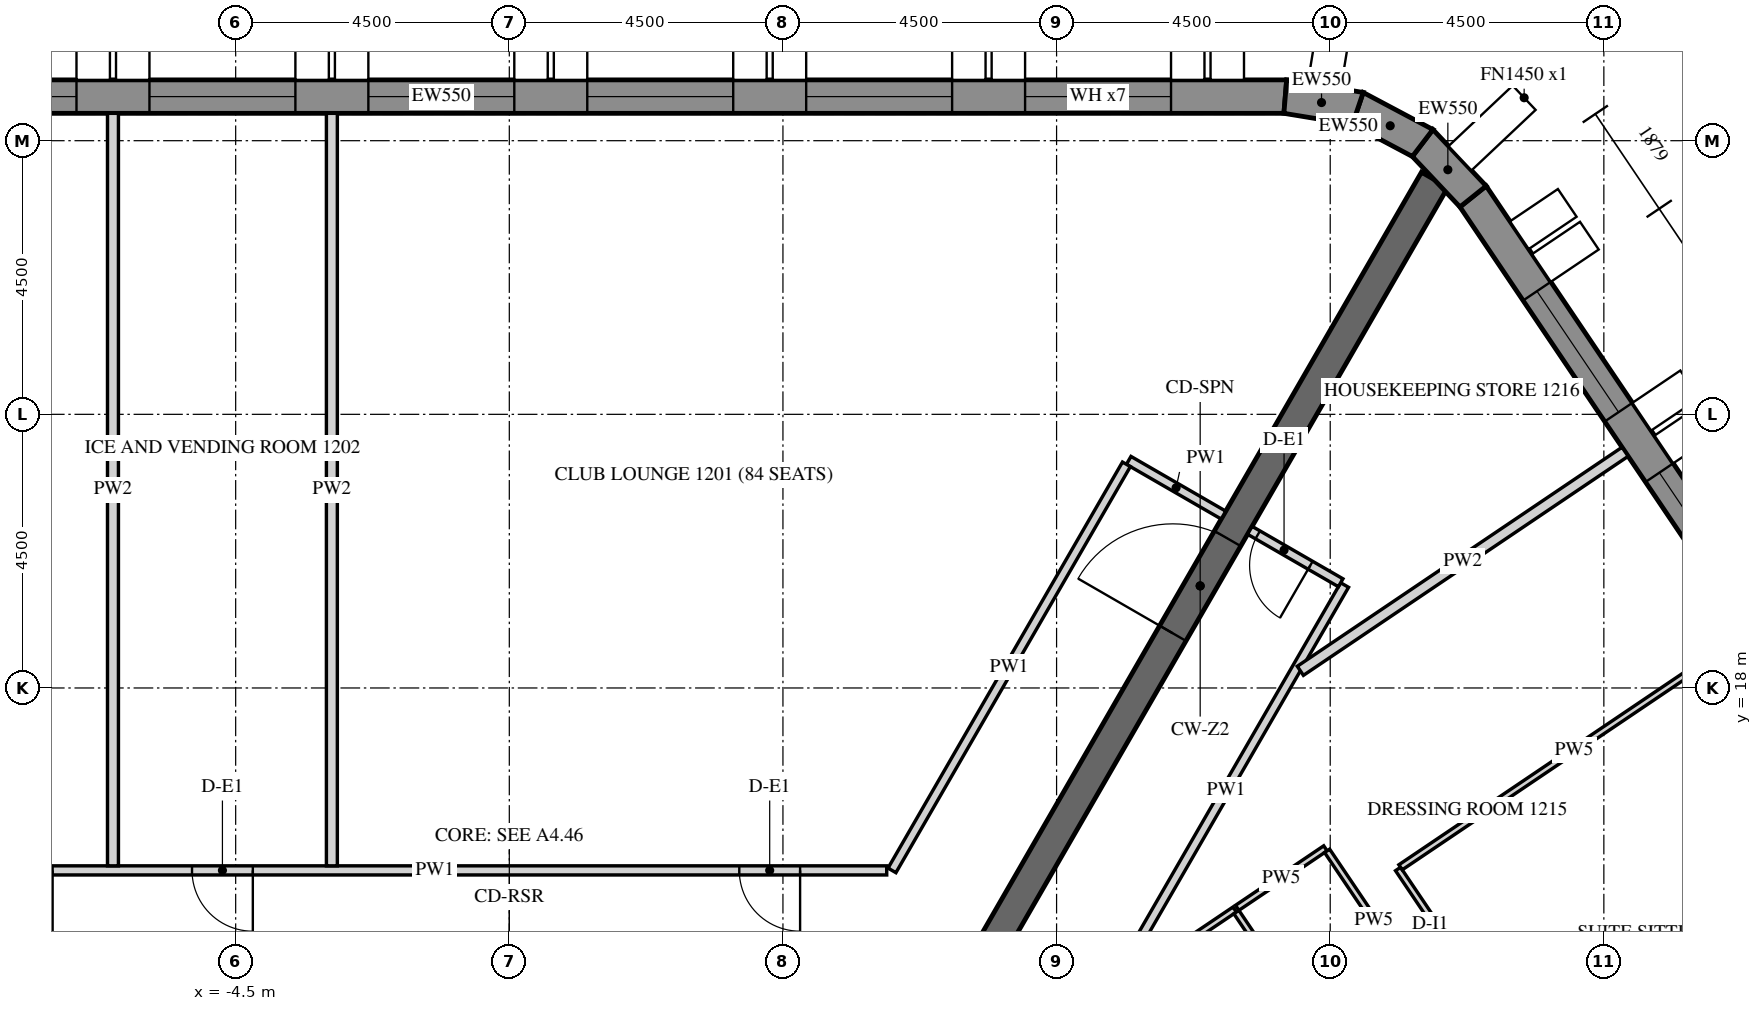
"""IFC4 building model, lengths in metres.
Left out: names, types, materials, properties, quantities, classifications, styles, units other than length and angle.
Written with IfcOpenShell. Run it as: python <this file> out.ifc"""

import sys

from ifc_helpers import new_model, si_unit, direction, frame, frame_2d, origin, place, context, subcontext, project, spatial, polyline, rectangle, outline, extrude, element, fill, save


model = new_model("IFC4")
c1 = context("Model", 3, precision=1e-05, world=origin(), true_north=direction((0.0, 1.0)))
c2 = subcontext(c1, "Body", "Model", "MODEL_VIEW")
j1 = project(units=[si_unit("LENGTHUNIT", "METRE"), si_unit("PLANEANGLEUNIT", "RADIAN")], contexts=[c1])
p1 = place(None, origin())
s1 = spatial("IfcSite", under=j1, at=p1, CompositionType="ELEMENT")
p2 = place(p1, origin())
s2 = spatial("IfcBuilding", under=s1, at=p2, CompositionType="ELEMENT")
p3 = place(p2, frame((0.0, 0.0, 164.4)))
s3 = spatial("IfcBuildingStorey", under=s2, at=p3, CompositionType="ELEMENT", Elevation=164.4)
p4 = place(p3, frame((12.761, 27.725, -0.15), z_axis=(0.0, 0.0, 1.0), x_axis=(-1.0, 0.0, 0.0)))
e1 = element("IfcWall", 1, at=p4, inside=s3, PredefinedType="SOLIDWALL", context=c2, shape_type="SweptSolid", body=[
    extrude(outline(polyline([(-0.022, -0.275), (27.783, -0.275), (27.732, 0.275), (0.022, 0.275), (-0.022, -0.275)])), origin(), (0.0, 0.0, 1.0), 3.9),
])
p5 = place(p4, frame((1.879, 0.0, 1.05)))
e2 = element("IfcOpeningElement", 2, at=p5, cuts=e1, PredefinedType="OPENING", context=c2, shape_type="SweptSolid", body=[
    extrude(rectangle(XDim=2.4, YDim=2.4, at=frame_2d((1.2, 1.2))), frame((0.0, 0.285, 0.0), z_axis=(0.0, -1.0, 0.0), x_axis=(1.0, 0.0, 0.0)), (0.0, 0.0, 1.0), 0.57),
])
p6 = place(p4, frame((5.479, 0.0, 1.05)))
e3 = element("IfcOpeningElement", 3, at=p6, cuts=e1, PredefinedType="OPENING", context=c2, shape_type="SweptSolid", body=[
    extrude(rectangle(XDim=2.4, YDim=2.4, at=frame_2d((1.2, 1.2))), frame((0.0, 0.285, 0.0), z_axis=(0.0, -1.0, 0.0), x_axis=(1.0, 0.0, 0.0)), (0.0, 0.0, 1.0), 0.57),
])
p7 = place(p4, frame((9.079, 0.0, 1.05)))
e4 = element("IfcOpeningElement", 4, at=p7, cuts=e1, PredefinedType="OPENING", context=c2, shape_type="SweptSolid", body=[
    extrude(rectangle(XDim=2.4, YDim=2.4, at=frame_2d((1.2, 1.2))), frame((0.0, 0.285, 0.0), z_axis=(0.0, -1.0, 0.0), x_axis=(1.0, 0.0, 0.0)), (0.0, 0.0, 1.0), 0.57),
])
p8 = place(p4, frame((12.679, 0.0, 1.05)))
e5 = element("IfcOpeningElement", 5, at=p8, cuts=e1, PredefinedType="OPENING", context=c2, shape_type="SweptSolid", body=[
    extrude(rectangle(XDim=2.4, YDim=2.4, at=frame_2d((1.2, 1.2))), frame((0.0, 0.285, 0.0), z_axis=(0.0, -1.0, 0.0), x_axis=(1.0, 0.0, 0.0)), (0.0, 0.0, 1.0), 0.57),
])
p9 = place(p4, frame((16.279, 0.0, 1.05)))
e6 = element("IfcOpeningElement", 6, at=p9, cuts=e1, PredefinedType="OPENING", context=c2, shape_type="SweptSolid", body=[
    extrude(rectangle(XDim=2.4, YDim=2.4, at=frame_2d((1.2, 1.2))), frame((0.0, 0.285, 0.0), z_axis=(0.0, -1.0, 0.0), x_axis=(1.0, 0.0, 0.0)), (0.0, 0.0, 1.0), 0.57),
])
p10 = place(p4, frame((19.879, 0.0, 1.05)))
e7 = element("IfcOpeningElement", 7, at=p10, cuts=e1, PredefinedType="OPENING", context=c2, shape_type="SweptSolid", body=[
    extrude(rectangle(XDim=2.4, YDim=2.4, at=frame_2d((1.2, 1.2))), frame((0.0, 0.285, 0.0), z_axis=(0.0, -1.0, 0.0), x_axis=(1.0, 0.0, 0.0)), (0.0, 0.0, 1.0), 0.57),
])
p11 = place(p4, frame((23.479, 0.0, 1.05)))
e8 = element("IfcOpeningElement", 8, at=p11, cuts=e1, PredefinedType="OPENING", context=c2, shape_type="SweptSolid", body=[
    extrude(rectangle(XDim=2.4, YDim=2.4, at=frame_2d((1.2, 1.2))), frame((0.0, 0.285, 0.0), z_axis=(0.0, -1.0, 0.0), x_axis=(1.0, 0.0, 0.0)), (0.0, 0.0, 1.0), 0.57),
])
p12 = place(p3, frame((31.371, 3.071, -0.15), z_axis=(0.0, 0.0, 1.0), x_axis=(-0.559189891278, 0.829039604297, 0.0)))
e9 = element("IfcWall", 9, at=p12, inside=s3, PredefinedType="SOLIDWALL", context=c2, shape_type="SweptSolid", body=[
    extrude(outline(polyline([(-0.026, -0.275), (27.781, -0.275), (27.736, 0.275), (0.026, 0.275), (-0.026, -0.275)])), origin(), (0.0, 0.0, 1.0), 3.9),
])
p13 = place(p12, frame((1.879, 0.0, 1.05)))
e10 = element("IfcOpeningElement", 10, at=p13, cuts=e9, PredefinedType="OPENING", context=c2, shape_type="SweptSolid", body=[
    extrude(rectangle(XDim=2.4, YDim=2.4, at=frame_2d((1.2, 1.2))), frame((0.0, 0.285, 0.0), z_axis=(0.0, -1.0, 0.0), x_axis=(1.0, 0.0, 0.0)), (0.0, 0.0, 1.0), 0.57),
])
p14 = place(p12, frame((5.479, 0.0, 1.05)))
e11 = element("IfcOpeningElement", 11, at=p14, cuts=e9, PredefinedType="OPENING", context=c2, shape_type="SweptSolid", body=[
    extrude(rectangle(XDim=2.4, YDim=2.4, at=frame_2d((1.2, 1.2))), frame((0.0, 0.285, 0.0), z_axis=(0.0, -1.0, 0.0), x_axis=(1.0, 0.0, 0.0)), (0.0, 0.0, 1.0), 0.57),
])
p15 = place(p12, frame((9.079, 0.0, 1.05)))
e12 = element("IfcOpeningElement", 12, at=p15, cuts=e9, PredefinedType="OPENING", context=c2, shape_type="SweptSolid", body=[
    extrude(rectangle(XDim=2.4, YDim=2.4, at=frame_2d((1.2, 1.2))), frame((0.0, 0.285, 0.0), z_axis=(0.0, -1.0, 0.0), x_axis=(1.0, 0.0, 0.0)), (0.0, 0.0, 1.0), 0.57),
])
p16 = place(p12, frame((12.679, 0.0, 1.05)))
e13 = element("IfcOpeningElement", 13, at=p16, cuts=e9, PredefinedType="OPENING", context=c2, shape_type="SweptSolid", body=[
    extrude(rectangle(XDim=2.4, YDim=2.4, at=frame_2d((1.2, 1.2))), frame((0.0, 0.285, 0.0), z_axis=(0.0, -1.0, 0.0), x_axis=(1.0, 0.0, 0.0)), (0.0, 0.0, 1.0), 0.57),
])
p17 = place(p12, frame((16.279, 0.0, 1.05)))
e14 = element("IfcOpeningElement", 14, at=p17, cuts=e9, PredefinedType="OPENING", context=c2, shape_type="SweptSolid", body=[
    extrude(rectangle(XDim=2.4, YDim=2.4, at=frame_2d((1.2, 1.2))), frame((0.0, 0.285, 0.0), z_axis=(0.0, -1.0, 0.0), x_axis=(1.0, 0.0, 0.0)), (0.0, 0.0, 1.0), 0.57),
])
p18 = place(p12, frame((19.879, 0.0, 1.05)))
e15 = element("IfcOpeningElement", 15, at=p18, cuts=e9, PredefinedType="OPENING", context=c2, shape_type="SweptSolid", body=[
    extrude(rectangle(XDim=2.4, YDim=2.4, at=frame_2d((1.2, 1.2))), frame((0.0, 0.285, 0.0), z_axis=(0.0, -1.0, 0.0), x_axis=(1.0, 0.0, 0.0)), (0.0, 0.0, 1.0), 0.57),
])
p19 = place(p12, frame((23.479, 0.0, 1.05)))
e16 = element("IfcOpeningElement", 16, at=p19, cuts=e9, PredefinedType="OPENING", context=c2, shape_type="SweptSolid", body=[
    extrude(rectangle(XDim=2.4, YDim=2.4, at=frame_2d((1.2, 1.2))), frame((0.0, 0.285, 0.0), z_axis=(0.0, -1.0, 0.0), x_axis=(1.0, 0.0, 0.0)), (0.0, 0.0, 1.0), 0.57),
])
p20 = place(p3, frame((15.849, 26.083, -0.15), z_axis=(0.0, 0.0, 1.0), x_axis=(-0.686196220404, 0.727416488061, 0.0)))
e17 = element("IfcWall", 17, at=p20, inside=s3, PredefinedType="SOLIDWALL", context=c2, shape_type="SweptSolid", body=[
    extrude(outline(polyline([(-0.022, -0.275), (1.253, -0.275), (1.163, 0.275), (0.022, 0.275), (-0.022, -0.275)])), origin(), (0.0, 0.0, 1.0), 3.9),
])
p21 = place(p3, frame((15.02, 26.962, -0.15), z_axis=(0.0, 0.0, 1.0), x_axis=(-0.882950818639, 0.469465495926, 0.0)))
e18 = element("IfcWall", 18, at=p21, inside=s3, PredefinedType="SOLIDWALL", context=c2, shape_type="SweptSolid", body=[
    extrude(outline(polyline([(-0.045, -0.275), (1.253, -0.275), (1.163, 0.275), (0.045, 0.275), (-0.045, -0.275)])), origin(), (0.0, 0.0, 1.0), 3.9),
])
p22 = place(p3, frame((13.953, 27.529, -0.15), z_axis=(0.0, 0.0, 1.0), x_axis=(-0.986751945211, 0.162236243244, 0.0)))
e19 = element("IfcWall", 19, at=p22, inside=s3, PredefinedType="SOLIDWALL", context=c2, shape_type="SweptSolid", body=[
    extrude(outline(polyline([(-0.045, -0.275), (1.231, -0.275), (1.186, 0.275), (0.045, 0.275), (-0.045, -0.275)])), origin(), (0.0, 0.0, 1.0), 3.9),
])
p23 = place(p3, frame((7.506, 13.0, -0.15), z_axis=(0.0, 0.0, 1.0), x_axis=(0.499988271576, 0.866032175087, 0.0)))
e20 = element("IfcWall", 20, at=p23, inside=s3, PredefinedType="SHEAR", context=c2, shape_type="SweptSolid", body=[
    extrude(rectangle(XDim=15.424, YDim=0.5, at=frame_2d((7.712, 0.0))), origin(), (0.0, 0.0, 1.0), 3.9),
])
p24 = place(p23, frame((6.812, 0.0, 0.15)))
e21 = element("IfcOpeningElement", 21, at=p24, cuts=e20, PredefinedType="OPENING", context=c2, shape_type="SweptSolid", body=[
    extrude(rectangle(XDim=1.8, YDim=2.4, at=frame_2d((0.9, 1.2))), frame((0.0, 0.26, 0.0), z_axis=(0.0, -1.0, 0.0), x_axis=(1.0, 0.0, 0.0)), (0.0, 0.0, 1.0), 0.52),
])
p25 = place(p3, frame((11.745, 20.843, 0.0), z_axis=(0.0, 0.0, 1.0), x_axis=(-0.865989075817, 0.500062916607, 0.0)))
e22 = element("IfcWall", 22, at=p25, inside=s3, PredefinedType="PARTITIONING", context=c2, shape_type="SweptSolid", body=[
    extrude(rectangle(XDim=1.8, YDim=0.15, at=frame_2d((0.9, 0.0))), origin(), (0.0, 0.0, 1.0), 2.988),
])
p26 = place(p3, frame((10.149, 21.678, 0.0), z_axis=(0.0, 0.0, 1.0), x_axis=(-0.499993780622, -0.866028994514, 0.0)))
e23 = element("IfcWall", 23, at=p26, inside=s3, PredefinedType="PARTITIONING", context=c2, shape_type="SweptSolid", body=[
    extrude(rectangle(XDim=7.711, YDim=0.15, at=frame_2d((3.855, 0.0))), origin(), (0.0, 0.0, 1.0), 2.988),
])
p27 = place(p3, frame((6.207, 15.0, 0.0), z_axis=(0.0, 0.0, 1.0), x_axis=(-1.0, 0.0, 0.0)))
e24 = element("IfcWall", 24, at=p27, inside=s3, PredefinedType="PARTITIONING", context=c2, shape_type="SweptSolid", body=[
    extrude(rectangle(XDim=14.867, YDim=0.15, at=frame_2d((7.433, 0.0))), origin(), (0.0, 0.0, 1.0), 2.988),
])
p28 = place(p27, frame((1.424, 0.0, 0.0)))
e25 = element("IfcOpeningElement", 25, at=p28, cuts=e24, PredefinedType="OPENING", context=c2, shape_type="SweptSolid", body=[
    extrude(rectangle(XDim=1.0, YDim=2.1, at=frame_2d((0.5, 1.05))), frame((0.0, 0.085, 0.0), z_axis=(0.0, -1.0, 0.0), x_axis=(1.0, 0.0, 0.0)), (0.0, 0.0, 1.0), 0.17),
])
p29 = place(p27, frame((10.424, 0.0, 0.0)))
e26 = element("IfcOpeningElement", 26, at=p29, cuts=e24, PredefinedType="OPENING", context=c2, shape_type="SweptSolid", body=[
    extrude(rectangle(XDim=1.0, YDim=2.1, at=frame_2d((0.5, 1.05))), frame((0.0, 0.085, 0.0), z_axis=(0.0, -1.0, 0.0), x_axis=(1.0, 0.0, 0.0)), (0.0, 0.0, 1.0), 0.17),
])
p30 = place(p27, frame((13.717, 0.0, 0.0)))
e27 = element("IfcOpeningElement", 27, at=p30, cuts=e24, PredefinedType="OPENING", context=c2, shape_type="SweptSolid", body=[
    extrude(rectangle(XDim=1.0, YDim=2.1, at=frame_2d((0.5, 1.05))), frame((0.0, 0.085, 0.0), z_axis=(0.0, -1.0, 0.0), x_axis=(1.0, 0.0, 0.0)), (0.0, 0.0, 1.0), 0.17),
])
p31 = place(p3, frame((9.844, 12.95, 0.0), z_axis=(0.0, 0.0, 1.0), x_axis=(0.500003831281, 0.866023191782, 0.0)))
e28 = element("IfcWall", 28, at=p31, inside=s3, PredefinedType="PARTITIONING", context=c2, shape_type="SweptSolid", body=[
    extrude(rectangle(XDim=7.786, YDim=0.15, at=frame_2d((3.893, 0.0))), origin(), (0.0, 0.0, 1.0), 2.988),
])
p32 = place(p3, frame((13.672, 19.73, 0.0), z_axis=(0.0, 0.0, 1.0), x_axis=(-0.866074815912, 0.499914405916, 0.0)))
e29 = element("IfcWall", 29, at=p32, inside=s3, PredefinedType="PARTITIONING", context=c2, shape_type="SweptSolid", body=[
    extrude(rectangle(XDim=1.725, YDim=0.15, at=frame_2d((0.862, 0.0))), origin(), (0.0, 0.0, 1.0), 2.988),
])
p33 = place(p32, frame((0.575, 0.0, 0.0)))
e30 = element("IfcOpeningElement", 30, at=p33, cuts=e29, PredefinedType="OPENING", context=c2, shape_type="SweptSolid", body=[
    extrude(rectangle(XDim=1.0, YDim=2.1, at=frame_2d((0.5, 1.05))), frame((0.0, 0.085, 0.0), z_axis=(0.0, -1.0, 0.0), x_axis=(1.0, 0.0, 0.0)), (0.0, 0.0, 1.0), 0.17),
])
for number, where, z_axis, x_axis in (
    (31, (-2.918, 27.45, 0.0), (0.0, 0.0, 1.0), (0.0, -1.0, 0.0)),
    (32, (-6.518, 27.45, 0.0), (0.0, 0.0, 1.0), (0.0, -1.0, 0.0)),
):
    element("IfcWall", number, at=place(p3, frame(where, z_axis=z_axis, x_axis=x_axis)), inside=s3, PredefinedType="PARTITIONING", context=c2, shape_type="SweptSolid", body=[
        extrude(rectangle(XDim=12.375, YDim=0.18, at=frame_2d((6.188, 0.0))), origin(), (0.0, 0.0, 1.0), 2.988),
    ])
p34 = place(p3, frame((9.986, 13.046, 0.0), z_axis=(0.0, 0.0, 1.0), x_axis=(0.829041811541, 0.559186618865, 0.0)))
e33 = element("IfcWall", 33, at=p34, inside=s3, PredefinedType="PARTITIONING", context=c2, shape_type="SweptSolid", body=[
    extrude(rectangle(XDim=2.344, YDim=0.1, at=frame_2d((1.172, 0.0))), origin(), (0.0, 0.0, 1.0), 2.988),
])
p35 = place(p3, frame((11.97, 14.384, 0.0), z_axis=(0.0, 0.0, 1.0), x_axis=(0.828968337787, 0.559295534532, 0.0)))
e34 = element("IfcWall", 34, at=p35, inside=s3, PredefinedType="PARTITIONING", context=c2, shape_type="SweptSolid", body=[
    extrude(rectangle(XDim=1.75, YDim=0.1, at=frame_2d((0.875, 0.0))), origin(), (0.0, 0.0, 1.0), 2.988),
])
p36 = place(p3, frame((13.449, 15.322, 0.0), z_axis=(0.0, 0.0, 1.0), x_axis=(0.559158698756, -0.8290606429, 0.0)))
e35 = element("IfcWall", 35, at=p36, inside=s3, PredefinedType="PARTITIONING", context=c2, shape_type="SweptSolid", body=[
    extrude(rectangle(XDim=2.75, YDim=0.1, at=frame_2d((1.375, 0.0))), origin(), (0.0, 0.0, 1.0), 2.988),
])
p37 = place(p3, frame((18.591, 9.129, 0.0), z_axis=(0.0, 0.0, 1.0), x_axis=(-0.559185029686, 0.829042883435, 0.0)))
e36 = element("IfcWall", 36, at=p37, inside=s3, PredefinedType="PARTITIONING", context=c2, shape_type="SweptSolid", body=[
    extrude(rectangle(XDim=7.11, YDim=0.1, at=frame_2d((3.555, 0.0))), origin(), (0.0, 0.0, 1.0), 2.988),
])
p38 = place(p37, frame((3.06, 0.0, 0.0)))
e37 = element("IfcOpeningElement", 37, at=p38, cuts=e36, PredefinedType="OPENING", context=c2, shape_type="SweptSolid", body=[
    extrude(rectangle(XDim=0.9, YDim=2.1, at=frame_2d((0.45, 1.05))), frame((0.0, 0.06, 0.0), z_axis=(0.0, -1.0, 0.0), x_axis=(1.0, 0.0, 0.0)), (0.0, 0.0, 1.0), 0.12),
])
p39 = place(p3, frame((14.657, 15.051, 0.0), z_axis=(0.0, 0.0, 1.0), x_axis=(0.829036561965, 0.559194401729, 0.0)))
e38 = element("IfcWall", 38, at=p39, inside=s3, PredefinedType="PARTITIONING", context=c2, shape_type="SweptSolid", body=[
    extrude(rectangle(XDim=6.883, YDim=0.1, at=frame_2d((3.441, 0.0))), origin(), (0.0, 0.0, 1.0), 2.988),
])
p40 = place(p3, frame((18.35, 21.884, 0.0), z_axis=(0.0, 0.0, 1.0), x_axis=(-0.829047205772, -0.559178621374, 0.0)))
e39 = element("IfcWall", 39, at=p40, inside=s3, PredefinedType="PARTITIONING", context=c2, shape_type="SweptSolid", body=[
    extrude(rectangle(XDim=6.442, YDim=0.18, at=frame_2d((3.221, 0.0))), origin(), (0.0, 0.0, 1.0), 2.988),
])
p41 = place(p3, frame((13.467, 12.077, 0.0), z_axis=(0.0, 0.0, 1.0), x_axis=(-0.559261631576, 0.828991210718, 0.0)))
e40 = element("IfcWall", 40, at=p41, inside=s3, PredefinedType="PARTITIONING", context=c2, shape_type="SweptSolid", body=[
    extrude(rectangle(XDim=2.7, YDim=0.1, at=frame_2d((1.35, 0.0))), origin(), (0.0, 0.0, 1.0), 2.988),
])
p42 = place(p5, frame((0.0, 0.205, 0.0)))
e41 = element("IfcWindow", 41, at=p42, inside=s3, PartitioningType="DOUBLE_PANEL_VERTICAL", PredefinedType="WINDOW", context=c2, shape_type="SweptSolid", body=[
    extrude(rectangle(XDim=2.4, YDim=2.4, at=frame_2d((1.2, 1.2))), frame((0.0, 0.03, 0.0), z_axis=(0.0, -1.0, 0.0), x_axis=(1.0, 0.0, 0.0)), (0.0, 0.0, 1.0), 0.06),
])
fill(e2, e41)
p43 = place(p6, frame((0.0, 0.205, 0.0)))
e42 = element("IfcWindow", 42, at=p43, inside=s3, PartitioningType="DOUBLE_PANEL_VERTICAL", PredefinedType="WINDOW", context=c2, shape_type="SweptSolid", body=[
    extrude(rectangle(XDim=2.4, YDim=2.4, at=frame_2d((1.2, 1.2))), frame((0.0, 0.03, 0.0), z_axis=(0.0, -1.0, 0.0), x_axis=(1.0, 0.0, 0.0)), (0.0, 0.0, 1.0), 0.06),
])
fill(e3, e42)
p44 = place(p7, frame((0.0, 0.205, 0.0)))
e43 = element("IfcWindow", 43, at=p44, inside=s3, PartitioningType="DOUBLE_PANEL_VERTICAL", PredefinedType="WINDOW", context=c2, shape_type="SweptSolid", body=[
    extrude(rectangle(XDim=2.4, YDim=2.4, at=frame_2d((1.2, 1.2))), frame((0.0, 0.03, 0.0), z_axis=(0.0, -1.0, 0.0), x_axis=(1.0, 0.0, 0.0)), (0.0, 0.0, 1.0), 0.06),
])
fill(e4, e43)
p45 = place(p8, frame((0.0, 0.205, 0.0)))
e44 = element("IfcWindow", 44, at=p45, inside=s3, PartitioningType="DOUBLE_PANEL_VERTICAL", PredefinedType="WINDOW", context=c2, shape_type="SweptSolid", body=[
    extrude(rectangle(XDim=2.4, YDim=2.4, at=frame_2d((1.2, 1.2))), frame((0.0, 0.03, 0.0), z_axis=(0.0, -1.0, 0.0), x_axis=(1.0, 0.0, 0.0)), (0.0, 0.0, 1.0), 0.06),
])
fill(e5, e44)
p46 = place(p9, frame((0.0, 0.205, 0.0)))
e45 = element("IfcWindow", 45, at=p46, inside=s3, PartitioningType="DOUBLE_PANEL_VERTICAL", PredefinedType="WINDOW", context=c2, shape_type="SweptSolid", body=[
    extrude(rectangle(XDim=2.4, YDim=2.4, at=frame_2d((1.2, 1.2))), frame((0.0, 0.03, 0.0), z_axis=(0.0, -1.0, 0.0), x_axis=(1.0, 0.0, 0.0)), (0.0, 0.0, 1.0), 0.06),
])
fill(e6, e45)
p47 = place(p10, frame((0.0, 0.205, 0.0)))
e46 = element("IfcWindow", 46, at=p47, inside=s3, PartitioningType="DOUBLE_PANEL_VERTICAL", PredefinedType="WINDOW", context=c2, shape_type="SweptSolid", body=[
    extrude(rectangle(XDim=2.4, YDim=2.4, at=frame_2d((1.2, 1.2))), frame((0.0, 0.03, 0.0), z_axis=(0.0, -1.0, 0.0), x_axis=(1.0, 0.0, 0.0)), (0.0, 0.0, 1.0), 0.06),
])
fill(e7, e46)
p48 = place(p18, frame((0.0, 0.205, 0.0)))
e47 = element("IfcWindow", 47, at=p48, inside=s3, PartitioningType="DOUBLE_PANEL_VERTICAL", PredefinedType="WINDOW", context=c2, shape_type="SweptSolid", body=[
    extrude(rectangle(XDim=2.4, YDim=2.4, at=frame_2d((1.2, 1.2))), frame((0.0, 0.03, 0.0), z_axis=(0.0, -1.0, 0.0), x_axis=(1.0, 0.0, 0.0)), (0.0, 0.0, 1.0), 0.06),
])
fill(e15, e47)
p49 = place(p19, frame((0.0, 0.205, 0.0)))
e48 = element("IfcWindow", 48, at=p49, inside=s3, PartitioningType="DOUBLE_PANEL_VERTICAL", PredefinedType="WINDOW", context=c2, shape_type="SweptSolid", body=[
    extrude(rectangle(XDim=2.4, YDim=2.4, at=frame_2d((1.2, 1.2))), frame((0.0, 0.03, 0.0), z_axis=(0.0, -1.0, 0.0), x_axis=(1.0, 0.0, 0.0)), (0.0, 0.0, 1.0), 0.06),
])
fill(e16, e48)
p50 = place(p24, origin())
e49 = element("IfcDoor", 49, at=p50, inside=s3, OperationType="DOUBLE_DOOR_SINGLE_SWING", PredefinedType="DOOR", context=c2, shape_type="SweptSolid", body=[
    extrude(rectangle(XDim=1.8, YDim=2.4, at=frame_2d((0.9, 1.2))), frame((0.0, 0.025, 0.0), z_axis=(0.0, -1.0, 0.0), x_axis=(1.0, 0.0, 0.0)), (0.0, 0.0, 1.0), 0.05),
])
fill(e21, e49)
p51 = place(p28, origin())
e50 = element("IfcDoor", 50, at=p51, inside=s3, OperationType="SINGLE_SWING_RIGHT", PredefinedType="DOOR", context=c2, shape_type="SweptSolid", body=[
    extrude(rectangle(XDim=1.0, YDim=2.1, at=frame_2d((0.5, 1.05))), frame((0.0, 0.025, 0.0), z_axis=(0.0, -1.0, 0.0), x_axis=(1.0, 0.0, 0.0)), (0.0, 0.0, 1.0), 0.05),
])
fill(e25, e50)
p52 = place(p29, origin())
e51 = element("IfcDoor", 51, at=p52, inside=s3, OperationType="SINGLE_SWING_RIGHT", PredefinedType="DOOR", context=c2, shape_type="SweptSolid", body=[
    extrude(rectangle(XDim=1.0, YDim=2.1, at=frame_2d((0.5, 1.05))), frame((0.0, 0.025, 0.0), z_axis=(0.0, -1.0, 0.0), x_axis=(1.0, 0.0, 0.0)), (0.0, 0.0, 1.0), 0.05),
])
fill(e26, e51)
p53 = place(p30, origin())
e52 = element("IfcDoor", 52, at=p53, inside=s3, OperationType="SINGLE_SWING_LEFT", PredefinedType="DOOR", context=c2, shape_type="SweptSolid", body=[
    extrude(rectangle(XDim=1.0, YDim=2.1, at=frame_2d((0.5, 1.05))), frame((0.0, 0.025, 0.0), z_axis=(0.0, -1.0, 0.0), x_axis=(1.0, 0.0, 0.0)), (0.0, 0.0, 1.0), 0.05),
])
fill(e27, e52)
p54 = place(p33, origin())
e53 = element("IfcDoor", 53, at=p54, inside=s3, OperationType="SINGLE_SWING_LEFT", PredefinedType="DOOR", context=c2, shape_type="SweptSolid", body=[
    extrude(rectangle(XDim=1.0, YDim=2.1, at=frame_2d((0.5, 1.05))), frame((0.0, 0.025, 0.0), z_axis=(0.0, -1.0, 0.0), x_axis=(1.0, 0.0, 0.0)), (0.0, 0.0, 1.0), 0.05),
])
fill(e30, e53)
save(model, sys.argv[1])
